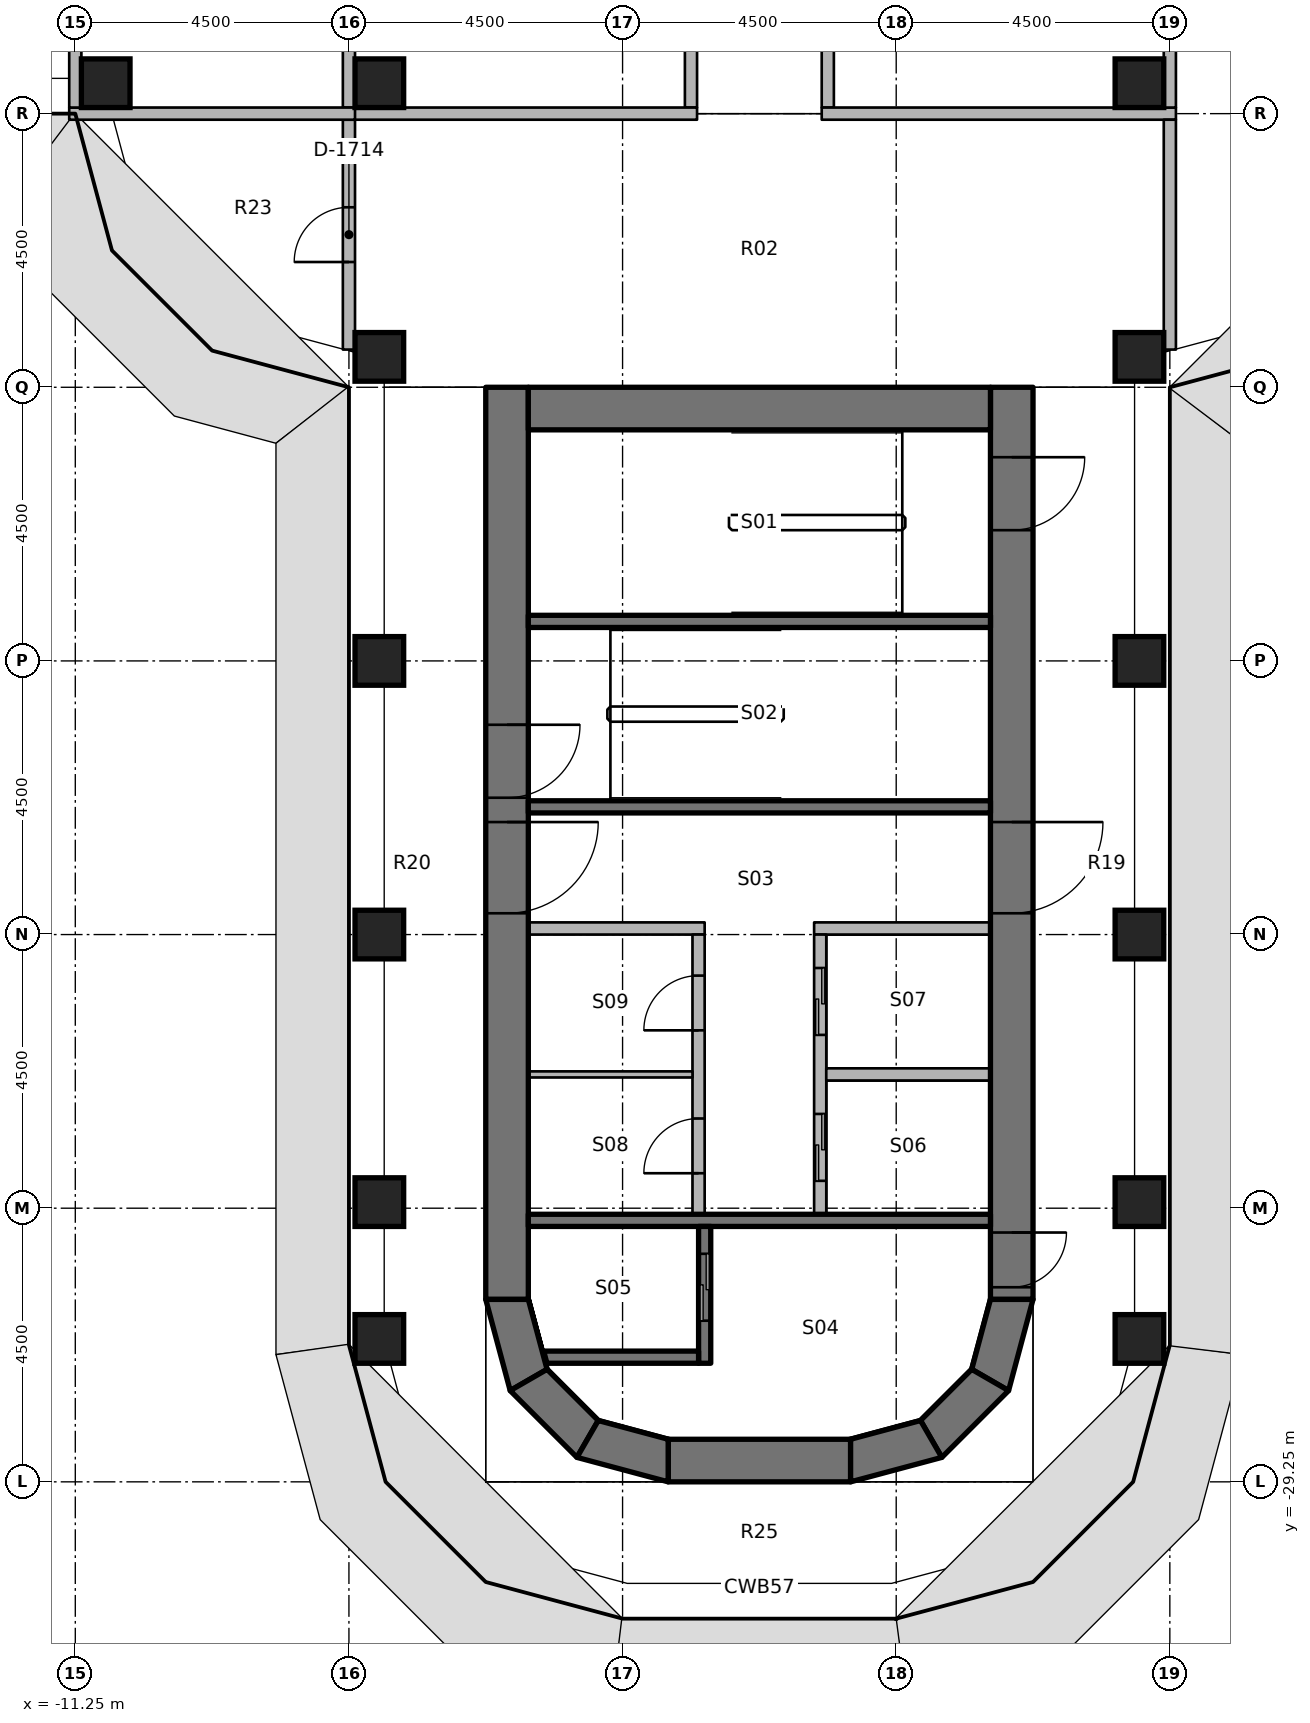
"""IFC4 building model, lengths in metres.
Left out: names, types, materials, properties, quantities, classifications, styles, units other than length and angle.
Written with IfcOpenShell. Run it as: python <this file> out.ifc"""

import sys

from ifc_helpers import new_model, si_unit, direction, frame, frame_2d, origin, origin_2d, place, context, subcontext, project, spatial, polyline, rectangle, outline, extrude, element, fill, save


model = new_model("IFC4")
c1 = context("Model", 3, precision=1e-05, world=origin(), true_north=direction((0.0, 1.0)))
c2 = subcontext(c1, "Body", "Model", "MODEL_VIEW")
j1 = project(units=[si_unit("LENGTHUNIT", "METRE"), si_unit("PLANEANGLEUNIT", "RADIAN")], contexts=[c1])
p1 = place(None, origin())
s1 = spatial("IfcSite", under=j1, at=p1, CompositionType="ELEMENT")
p2 = place(p1, origin())
s2 = spatial("IfcBuilding", under=s1, at=p2, CompositionType="ELEMENT")
p3 = place(p2, frame((0.0, 0.0, 160.0)))
s3 = spatial("IfcBuildingStorey", under=s2, at=p3, CompositionType="ELEMENT", Elevation=160.0)
for number, where, z_axis, x_axis in (
    (1, (-10.75, -6.25, 0.0), (0.0, 0.0, 1.0), (1.0, 0.0, 0.0)),
    (2, (-6.25, -26.9, 0.0), (0.0, 0.0, 1.0), (1.0, 0.0, 0.0)),
    (3, (-6.25, -24.65, 0.0), (0.0, 0.0, 1.0), (1.0, 0.0, 0.0)),
    (4, (-6.25, -20.25, 0.0), (0.0, 0.0, 1.0), (1.0, 0.0, 0.0)),
    (5, (-6.25, -15.75, 0.0), (0.0, 0.0, 1.0), (1.0, 0.0, 0.0)),
    (6, (-6.25, -10.75, 0.0), (0.0, 0.0, 1.0), (1.0, 0.0, 0.0)),
    (7, (-6.25, -6.25, 0.0), (0.0, 0.0, 1.0), (1.0, 0.0, 0.0)),
    (8, (6.25, -26.9, 0.0), (0.0, 0.0, 1.0), (1.0, 0.0, 0.0)),
    (9, (6.25, -24.65, 0.0), (0.0, 0.0, 1.0), (1.0, 0.0, 0.0)),
    (10, (6.25, -20.25, 0.0), (0.0, 0.0, 1.0), (1.0, 0.0, 0.0)),
    (11, (6.25, -15.75, 0.0), (0.0, 0.0, 1.0), (1.0, 0.0, 0.0)),
    (12, (6.25, -10.75, 0.0), (0.0, 0.0, 1.0), (1.0, 0.0, 0.0)),
    (13, (6.25, -6.25, 0.0), (0.0, 0.0, 1.0), (1.0, 0.0, 0.0)),
):
    element("IfcColumn", number, at=place(p3, frame(where, z_axis=z_axis, x_axis=x_axis)), inside=s3, PredefinedType="COLUMN", context=c2, shape_type="SweptSolid", body=[
        extrude(rectangle(XDim=0.8, YDim=0.8, at=origin_2d()), origin(), (0.0, 0.0, 1.0), 3.65),
    ])
p4 = place(p3, frame((-4.15, -11.25, 0.0), z_axis=(0.0, 0.0, 1.0), x_axis=(0.0, -1.0, 0.0)))
e14 = element("IfcWall", 14, at=p4, inside=s3, PredefinedType="SHEAR", context=c2, shape_type="SweptSolid", body=[
    extrude(rectangle(XDim=15.0, YDim=0.7, at=frame_2d((7.5, 0.0))), origin(), (0.0, 0.0, 1.0), 3.8),
])
p5 = place(p4, frame((7.15, 0.0, 0.0)))
e15 = element("IfcOpeningElement", 15, at=p5, cuts=e14, PredefinedType="OPENING", context=c2, shape_type="SweptSolid", body=[
    extrude(rectangle(XDim=1.5, YDim=2.3, at=frame_2d((0.75, 1.15))), frame((0.0, 0.36, 0.0), z_axis=(0.0, -1.0, 0.0), x_axis=(1.0, 0.0, 0.0)), (0.0, 0.0, 1.0), 0.72),
])
p6 = place(p4, frame((5.55, 0.0, 0.0)))
e16 = element("IfcOpeningElement", 16, at=p6, cuts=e14, PredefinedType="OPENING", context=c2, shape_type="SweptSolid", body=[
    extrude(rectangle(XDim=1.2, YDim=2.1, at=frame_2d((0.6, 1.05))), frame((0.0, 0.36, 0.0), z_axis=(0.0, -1.0, 0.0), x_axis=(1.0, 0.0, 0.0)), (0.0, 0.0, 1.0), 0.72),
])
p7 = place(p3, frame((4.15, -11.25, 0.0), z_axis=(0.0, 0.0, 1.0), x_axis=(0.0, -1.0, 0.0)))
e17 = element("IfcWall", 17, at=p7, inside=s3, PredefinedType="SHEAR", context=c2, shape_type="SweptSolid", body=[
    extrude(rectangle(XDim=15.0, YDim=0.7, at=frame_2d((7.5, 0.0))), origin(), (0.0, 0.0, 1.0), 3.8),
])
p8 = place(p7, frame((7.15, 0.0, 0.0)))
e18 = element("IfcOpeningElement", 18, at=p8, cuts=e17, PredefinedType="OPENING", context=c2, shape_type="SweptSolid", body=[
    extrude(rectangle(XDim=1.5, YDim=2.3, at=frame_2d((0.75, 1.15))), frame((0.0, 0.36, 0.0), z_axis=(0.0, -1.0, 0.0), x_axis=(1.0, 0.0, 0.0)), (0.0, 0.0, 1.0), 0.72),
])
p9 = place(p7, frame((13.9, 0.0, 0.0)))
e19 = element("IfcOpeningElement", 19, at=p9, cuts=e17, PredefinedType="OPENING", context=c2, shape_type="SweptSolid", body=[
    extrude(rectangle(XDim=0.9, YDim=2.1, at=frame_2d((0.45, 1.05))), frame((0.0, 0.36, 0.0), z_axis=(0.0, -1.0, 0.0), x_axis=(1.0, 0.0, 0.0)), (0.0, 0.0, 1.0), 0.72),
])
p10 = place(p7, frame((1.15, 0.0, 0.0)))
e20 = element("IfcOpeningElement", 20, at=p10, cuts=e17, PredefinedType="OPENING", context=c2, shape_type="SweptSolid", body=[
    extrude(rectangle(XDim=1.2, YDim=2.1, at=frame_2d((0.6, 1.05))), frame((0.0, 0.36, 0.0), z_axis=(0.0, -1.0, 0.0), x_axis=(1.0, 0.0, 0.0)), (0.0, 0.0, 1.0), 0.72),
])
p11 = place(p3, frame((-3.8, -11.6, 0.0), z_axis=(0.0, 0.0, 1.0), x_axis=(1.0, 0.0, 0.0)))
e21 = element("IfcWall", 21, at=p11, inside=s3, PredefinedType="SHEAR", context=c2, shape_type="SweptSolid", body=[
    extrude(rectangle(XDim=7.6, YDim=0.7, at=frame_2d((3.8, 0.0))), origin(), (0.0, 0.0, 1.0), 3.8),
])
p12 = place(p3, frame((-1.5, -28.9, 0.0), z_axis=(0.0, 0.0, 1.0), x_axis=(1.0, 0.0, 0.0)))
e22 = element("IfcWall", 22, at=p12, inside=s3, PredefinedType="SHEAR", context=c2, shape_type="SweptSolid", body=[
    extrude(rectangle(XDim=3.0, YDim=0.7, at=frame_2d((1.5, 0.0))), origin(), (0.0, 0.0, 1.0), 3.8),
])
p13 = place(p3, origin())
e23 = element("IfcWall", 23, at=p13, inside=s3, PredefinedType="SHEAR", context=c2, shape_type="SweptSolid", body=[
    extrude(outline(polyline([(-4.5, -26.25), (-4.098, -27.75), (-3.492, -27.4), (-3.8, -26.25), (-4.5, -26.25)])), origin(), (0.0, 0.0, 1.0), 3.8),
])
p14 = place(p3, origin())
e24 = element("IfcWall", 24, at=p14, inside=s3, PredefinedType="SHEAR", context=c2, shape_type="SweptSolid", body=[
    extrude(outline(polyline([(-4.098, -27.75), (-3.0, -28.848), (-2.65, -28.242), (-3.492, -27.4), (-4.098, -27.75)])), origin(), (0.0, 0.0, 1.0), 3.8),
])
p15 = place(p3, origin())
e25 = element("IfcWall", 25, at=p15, inside=s3, PredefinedType="SHEAR", context=c2, shape_type="SweptSolid", body=[
    extrude(outline(polyline([(-3.0, -28.848), (-1.5, -29.25), (-1.5, -28.55), (-2.65, -28.242), (-3.0, -28.848)])), origin(), (0.0, 0.0, 1.0), 3.8),
])
p16 = place(p3, origin())
e26 = element("IfcWall", 26, at=p16, inside=s3, PredefinedType="SHEAR", context=c2, shape_type="SweptSolid", body=[
    extrude(outline(polyline([(4.5, -26.25), (4.098, -27.75), (3.492, -27.4), (3.8, -26.25), (4.5, -26.25)])), origin(), (0.0, 0.0, 1.0), 3.8),
])
p17 = place(p3, origin())
e27 = element("IfcWall", 27, at=p17, inside=s3, PredefinedType="SHEAR", context=c2, shape_type="SweptSolid", body=[
    extrude(outline(polyline([(4.098, -27.75), (3.0, -28.848), (2.65, -28.242), (3.492, -27.4), (4.098, -27.75)])), origin(), (0.0, 0.0, 1.0), 3.8),
])
p18 = place(p3, origin())
e28 = element("IfcWall", 28, at=p18, inside=s3, PredefinedType="SHEAR", context=c2, shape_type="SweptSolid", body=[
    extrude(outline(polyline([(3.0, -28.848), (1.5, -29.25), (1.5, -28.55), (2.65, -28.242), (3.0, -28.848)])), origin(), (0.0, 0.0, 1.0), 3.8),
])
p19 = place(p3, frame((3.8, -24.95, 0.0), z_axis=(0.0, 0.0, 1.0), x_axis=(-1.0, 0.0, 0.0)))
e29 = element("IfcWall", 29, at=p19, inside=s3, PredefinedType="SHEAR", context=c2, shape_type="SweptSolid", body=[
    extrude(rectangle(XDim=7.6, YDim=0.2, at=frame_2d((3.8, 0.0))), origin(), (0.0, 0.0, 1.0), 3.65),
])
p20 = place(p3, frame((-0.9, -27.3, 0.0), z_axis=(0.0, 0.0, 1.0), x_axis=(0.0, 1.0, 0.0)))
e30 = element("IfcWall", 30, at=p20, inside=s3, PredefinedType="SHEAR", context=c2, shape_type="SweptSolid", body=[
    extrude(rectangle(XDim=2.25, YDim=0.2, at=frame_2d((1.125, 0.0))), origin(), (0.0, 0.0, 1.0), 3.65),
])
p21 = place(p20, frame((0.7, 0.0, 0.0)))
e31 = element("IfcOpeningElement", 31, at=p21, cuts=e30, PredefinedType="OPENING", context=c2, shape_type="SweptSolid", body=[
    extrude(rectangle(XDim=1.1, YDim=2.3, at=frame_2d((0.55, 1.15))), frame((0.0, 0.11, 0.0), z_axis=(0.0, -1.0, 0.0), x_axis=(1.0, 0.0, 0.0)), (0.0, 0.0, 1.0), 0.22),
])
p22 = place(p3, origin())
e32 = element("IfcWall", 32, at=p22, inside=s3, PredefinedType="SHEAR", context=c2, shape_type="SweptSolid", body=[
    extrude(outline(polyline([(-1.0, -27.1), (-3.548, -27.1), (-3.494, -27.3), (-1.0, -27.3), (-1.0, -27.1)])), origin(), (0.0, 0.0, 1.0), 3.65),
])
for number, where, z_axis, x_axis in (
    (33, (3.8, -18.15, 0.0), (0.0, 0.0, 1.0), (-1.0, 0.0, 0.0)),
    (34, (3.8, -15.1, 0.0), (0.0, 0.0, 1.0), (-1.0, 0.0, 0.0)),
):
    element("IfcWall", number, at=place(p3, frame(where, z_axis=z_axis, x_axis=x_axis)), inside=s3, PredefinedType="SHEAR", context=c2, shape_type="SweptSolid", body=[
        extrude(rectangle(XDim=7.6, YDim=0.2, at=frame_2d((3.8, 0.0))), origin(), (0.0, 0.0, 1.0), 3.65),
    ])
p23 = place(p3, frame((3.8, -20.15, 0.0), z_axis=(0.0, 0.0, 1.0), x_axis=(-1.0, 0.0, 0.0)))
e35 = element("IfcWall", 35, at=p23, inside=s3, PredefinedType="PARTITIONING", context=c2, shape_type="SweptSolid", body=[
    extrude(rectangle(XDim=2.9, YDim=0.2, at=frame_2d((1.45, 0.0))), origin(), (0.0, 0.0, 1.0), 3.65),
])
p24 = place(p3, frame((1.0, -24.85, 0.0), z_axis=(0.0, 0.0, 1.0), x_axis=(0.0, 1.0, 0.0)))
e36 = element("IfcWall", 36, at=p24, inside=s3, PredefinedType="PARTITIONING", context=c2, shape_type="SweptSolid", body=[
    extrude(rectangle(XDim=4.6, YDim=0.2, at=frame_2d((2.3, 0.0))), origin(), (0.0, 0.0, 1.0), 3.65),
])
p25 = place(p24, frame((0.55, 0.0, 0.0)))
e37 = element("IfcOpeningElement", 37, at=p25, cuts=e36, PredefinedType="OPENING", context=c2, shape_type="SweptSolid", body=[
    extrude(rectangle(XDim=1.1, YDim=2.3, at=frame_2d((0.55, 1.15))), frame((0.0, 0.11, 0.0), z_axis=(0.0, -1.0, 0.0), x_axis=(1.0, 0.0, 0.0)), (0.0, 0.0, 1.0), 0.22),
])
p26 = place(p24, frame((2.95, 0.0, 0.0)))
e38 = element("IfcOpeningElement", 38, at=p26, cuts=e36, PredefinedType="OPENING", context=c2, shape_type="SweptSolid", body=[
    extrude(rectangle(XDim=1.1, YDim=2.3, at=frame_2d((0.55, 1.15))), frame((0.0, 0.11, 0.0), z_axis=(0.0, -1.0, 0.0), x_axis=(1.0, 0.0, 0.0)), (0.0, 0.0, 1.0), 0.22),
])
p27 = place(p3, frame((-0.9, -20.15, 0.0), z_axis=(0.0, 0.0, 1.0), x_axis=(-1.0, 0.0, 0.0)))
e39 = element("IfcWall", 39, at=p27, inside=s3, PredefinedType="PARTITIONING", context=c2, shape_type="SweptSolid", body=[
    extrude(rectangle(XDim=2.9, YDim=0.2, at=frame_2d((1.45, 0.0))), origin(), (0.0, 0.0, 1.0), 3.65),
])
p28 = place(p3, frame((-1.0, -24.85, 0.0), z_axis=(0.0, 0.0, 1.0), x_axis=(0.0, 1.0, 0.0)))
e40 = element("IfcWall", 40, at=p28, inside=s3, PredefinedType="PARTITIONING", context=c2, shape_type="SweptSolid", body=[
    extrude(rectangle(XDim=4.6, YDim=0.2, at=frame_2d((2.3, 0.0))), origin(), (0.0, 0.0, 1.0), 3.65),
])
p29 = place(p28, frame((0.675, 0.0, 0.0)))
e41 = element("IfcOpeningElement", 41, at=p29, cuts=e40, PredefinedType="OPENING", context=c2, shape_type="SweptSolid", body=[
    extrude(rectangle(XDim=0.9, YDim=2.1, at=frame_2d((0.45, 1.05))), frame((0.0, 0.11, 0.0), z_axis=(0.0, -1.0, 0.0), x_axis=(1.0, 0.0, 0.0)), (0.0, 0.0, 1.0), 0.22),
])
p30 = place(p28, frame((3.025, 0.0, 0.0)))
e42 = element("IfcOpeningElement", 42, at=p30, cuts=e40, PredefinedType="OPENING", context=c2, shape_type="SweptSolid", body=[
    extrude(rectangle(XDim=0.9, YDim=2.1, at=frame_2d((0.45, 1.05))), frame((0.0, 0.11, 0.0), z_axis=(0.0, -1.0, 0.0), x_axis=(1.0, 0.0, 0.0)), (0.0, 0.0, 1.0), 0.22),
])
p31 = place(p3, frame((3.8, -22.55, 0.0), z_axis=(0.0, 0.0, 1.0), x_axis=(-1.0, 0.0, 0.0)))
e43 = element("IfcWall", 43, at=p31, inside=s3, PredefinedType="PARTITIONING", context=c2, shape_type="SweptSolid", body=[
    extrude(rectangle(XDim=2.7, YDim=0.2, at=frame_2d((1.35, 0.0))), origin(), (0.0, 0.0, 1.0), 3.65),
])
p32 = place(p3, frame((-1.1, -22.55, 0.0), z_axis=(0.0, 0.0, 1.0), x_axis=(-1.0, 0.0, 0.0)))
e44 = element("IfcWall", 44, at=p32, inside=s3, PredefinedType="PARTITIONING", context=c2, shape_type="SweptSolid", body=[
    extrude(rectangle(XDim=2.7, YDim=0.1, at=frame_2d((1.35, 0.0))), origin(), (0.0, 0.0, 1.0), 3.65),
])
for number, where, z_axis, x_axis in (
    (45, (1.125, -6.65, 0.0), (0.0, 0.0, 1.0), (0.0, 1.0, 0.0)),
    (46, (-1.125, -6.65, 0.0), (0.0, 0.0, 1.0), (0.0, 1.0, 0.0)),
):
    element("IfcWall", number, at=place(p3, frame(where, z_axis=z_axis, x_axis=x_axis)), inside=s3, PredefinedType="PARTITIONING", context=c2, shape_type="SweptSolid", body=[
        extrude(rectangle(XDim=4.3, YDim=0.2, at=frame_2d((2.15, 0.0))), origin(), (0.0, 0.0, 1.0), 2.75),
    ])
p33 = place(p3, frame((1.025, -6.75, 0.0), z_axis=(0.0, 0.0, 1.0), x_axis=(1.0, 0.0, 0.0)))
e47 = element("IfcWall", 47, at=p33, inside=s3, PredefinedType="PARTITIONING", context=c2, shape_type="SweptSolid", body=[
    extrude(rectangle(XDim=5.825, YDim=0.2, at=frame_2d((2.913, 0.0))), origin(), (0.0, 0.0, 1.0), 2.75),
])
p34 = place(p3, frame((6.75, -10.63, 0.0), z_axis=(0.0, 0.0, 1.0), x_axis=(0.0, 1.0, 0.0)))
e48 = element("IfcWall", 48, at=p34, inside=s3, PredefinedType="PARTITIONING", context=c2, shape_type="SweptSolid", body=[
    extrude(rectangle(XDim=3.78, YDim=0.2, at=frame_2d((1.89, 0.0))), origin(), (0.0, 0.0, 1.0), 2.75),
])
p35 = place(p3, frame((-6.85, -6.75, 0.0), z_axis=(0.0, 0.0, 1.0), x_axis=(1.0, 0.0, 0.0)))
e49 = element("IfcWall", 49, at=p35, inside=s3, PredefinedType="PARTITIONING", context=c2, shape_type="SweptSolid", body=[
    extrude(rectangle(XDim=5.825, YDim=0.2, at=frame_2d((2.913, 0.0))), origin(), (0.0, 0.0, 1.0), 2.75),
])
p36 = place(p3, frame((-6.75, -10.63, 0.0), z_axis=(0.0, 0.0, 1.0), x_axis=(0.0, 1.0, 0.0)))
e50 = element("IfcWall", 50, at=p36, inside=s3, PredefinedType="PARTITIONING", context=c2, shape_type="SweptSolid", body=[
    extrude(rectangle(XDim=3.78, YDim=0.2, at=frame_2d((1.89, 0.0))), origin(), (0.0, 0.0, 1.0), 2.75),
])
p37 = place(p36, frame((1.44, 0.0, 0.0)))
e51 = element("IfcOpeningElement", 51, at=p37, cuts=e50, PredefinedType="OPENING", context=c2, shape_type="SweptSolid", body=[
    extrude(rectangle(XDim=0.9, YDim=2.1, at=frame_2d((0.45, 1.05))), frame((0.0, 0.11, 0.0), z_axis=(0.0, -1.0, 0.0), x_axis=(1.0, 0.0, 0.0)), (0.0, 0.0, 1.0), 0.22),
])
for number, where, z_axis, x_axis in (
    (52, (6.75, -6.65, 0.0), (0.0, 0.0, 1.0), (0.0, 1.0, 0.0)),
    (53, (-6.75, -6.65, 0.0), (0.0, 0.0, 1.0), (0.0, 1.0, 0.0)),
):
    element("IfcWall", number, at=place(p3, frame(where, z_axis=z_axis, x_axis=x_axis)), inside=s3, PredefinedType="PARTITIONING", context=c2, shape_type="SweptSolid", body=[
        extrude(rectangle(XDim=4.3, YDim=0.2, at=frame_2d((2.15, 0.0))), origin(), (0.0, 0.0, 1.0), 2.75),
    ])
p38 = place(p3, frame((-11.35, -6.75, 0.0), z_axis=(0.0, 0.0, 1.0), x_axis=(1.0, 0.0, 0.0)))
e54 = element("IfcWall", 54, at=p38, inside=s3, PredefinedType="PARTITIONING", context=c2, shape_type="SweptSolid", body=[
    extrude(rectangle(XDim=4.7, YDim=0.2, at=frame_2d((2.35, 0.0))), origin(), (0.0, 0.0, 1.0), 2.75),
])
p39 = place(p3, frame((-11.25, -6.65, 0.0), z_axis=(0.0, 0.0, 1.0), x_axis=(0.0, 1.0, 0.0)))
e55 = element("IfcWall", 55, at=p39, inside=s3, PredefinedType="PARTITIONING", context=c2, shape_type="SweptSolid", body=[
    extrude(rectangle(XDim=4.3, YDim=0.2, at=frame_2d((2.15, 0.0))), origin(), (0.0, 0.0, 1.0), 2.75),
])
p40 = place(p8, origin())
e56 = element("IfcDoor", 56, at=p40, inside=s3, OperationType="DOUBLE_DOOR_SINGLE_SWING", PredefinedType="DOOR", context=c2, shape_type="SweptSolid", body=[
    extrude(rectangle(XDim=1.5, YDim=2.3, at=frame_2d((0.75, 1.15))), frame((0.0, 0.025, 0.0), z_axis=(0.0, -1.0, 0.0), x_axis=(1.0, 0.0, 0.0)), (0.0, 0.0, 1.0), 0.05),
])
fill(e18, e56)
p41 = place(p5, origin())
e57 = element("IfcDoor", 57, at=p41, inside=s3, OperationType="DOUBLE_DOOR_SINGLE_SWING", PredefinedType="DOOR", context=c2, shape_type="SweptSolid", body=[
    extrude(rectangle(XDim=1.5, YDim=2.3, at=frame_2d((0.75, 1.15))), frame((0.0, 0.025, 0.0), z_axis=(0.0, -1.0, 0.0), x_axis=(1.0, 0.0, 0.0)), (0.0, 0.0, 1.0), 0.05),
])
fill(e15, e57)
p42 = place(p9, origin())
e58 = element("IfcDoor", 58, at=p42, inside=s3, OperationType="SINGLE_SWING_LEFT", PredefinedType="DOOR", context=c2, shape_type="SweptSolid", body=[
    extrude(rectangle(XDim=0.9, YDim=2.1, at=frame_2d((0.45, 1.05))), frame((0.0, 0.025, 0.0), z_axis=(0.0, -1.0, 0.0), x_axis=(1.0, 0.0, 0.0)), (0.0, 0.0, 1.0), 0.05),
])
fill(e19, e58)
p43 = place(p6, origin())
e59 = element("IfcDoor", 59, at=p43, inside=s3, OperationType="SINGLE_SWING_RIGHT", PredefinedType="DOOR", context=c2, shape_type="SweptSolid", body=[
    extrude(rectangle(XDim=1.2, YDim=2.1, at=frame_2d((0.6, 1.05))), frame((0.0, 0.025, 0.0), z_axis=(0.0, -1.0, 0.0), x_axis=(1.0, 0.0, 0.0)), (0.0, 0.0, 1.0), 0.05),
])
fill(e16, e59)
p44 = place(p10, origin())
e60 = element("IfcDoor", 60, at=p44, inside=s3, OperationType="SINGLE_SWING_RIGHT", PredefinedType="DOOR", context=c2, shape_type="SweptSolid", body=[
    extrude(rectangle(XDim=1.2, YDim=2.1, at=frame_2d((0.6, 1.05))), frame((0.0, 0.025, 0.0), z_axis=(0.0, -1.0, 0.0), x_axis=(1.0, 0.0, 0.0)), (0.0, 0.0, 1.0), 0.05),
])
fill(e20, e60)
p45 = place(p21, origin())
e61 = element("IfcDoor", 61, at=p45, inside=s3, OperationType="DOUBLE_DOOR_SLIDING", PredefinedType="DOOR", context=c2, shape_type="SweptSolid", body=[
    extrude(rectangle(XDim=1.1, YDim=2.3, at=frame_2d((0.55, 1.15))), frame((0.0, 0.025, 0.0), z_axis=(0.0, -1.0, 0.0), x_axis=(1.0, 0.0, 0.0)), (0.0, 0.0, 1.0), 0.05),
])
fill(e31, e61)
p46 = place(p25, origin())
e62 = element("IfcDoor", 62, at=p46, inside=s3, OperationType="DOUBLE_DOOR_SLIDING", PredefinedType="DOOR", context=c2, shape_type="SweptSolid", body=[
    extrude(rectangle(XDim=1.1, YDim=2.3, at=frame_2d((0.55, 1.15))), frame((0.0, 0.025, 0.0), z_axis=(0.0, -1.0, 0.0), x_axis=(1.0, 0.0, 0.0)), (0.0, 0.0, 1.0), 0.05),
])
fill(e37, e62)
p47 = place(p26, origin())
e63 = element("IfcDoor", 63, at=p47, inside=s3, OperationType="DOUBLE_DOOR_SLIDING", PredefinedType="DOOR", context=c2, shape_type="SweptSolid", body=[
    extrude(rectangle(XDim=1.1, YDim=2.3, at=frame_2d((0.55, 1.15))), frame((0.0, 0.025, 0.0), z_axis=(0.0, -1.0, 0.0), x_axis=(1.0, 0.0, 0.0)), (0.0, 0.0, 1.0), 0.05),
])
fill(e38, e63)
p48 = place(p29, origin())
e64 = element("IfcDoor", 64, at=p48, inside=s3, OperationType="SINGLE_SWING_LEFT", PredefinedType="DOOR", context=c2, shape_type="SweptSolid", body=[
    extrude(rectangle(XDim=0.9, YDim=2.1, at=frame_2d((0.45, 1.05))), frame((0.0, 0.025, 0.0), z_axis=(0.0, -1.0, 0.0), x_axis=(1.0, 0.0, 0.0)), (0.0, 0.0, 1.0), 0.05),
])
fill(e41, e64)
p49 = place(p30, origin())
e65 = element("IfcDoor", 65, at=p49, inside=s3, OperationType="SINGLE_SWING_LEFT", PredefinedType="DOOR", context=c2, shape_type="SweptSolid", body=[
    extrude(rectangle(XDim=0.9, YDim=2.1, at=frame_2d((0.45, 1.05))), frame((0.0, 0.025, 0.0), z_axis=(0.0, -1.0, 0.0), x_axis=(1.0, 0.0, 0.0)), (0.0, 0.0, 1.0), 0.05),
])
fill(e42, e65)
p50 = place(p37, origin())
e66 = element("IfcDoor", 66, at=p50, inside=s3, OperationType="SINGLE_SWING_RIGHT", PredefinedType="DOOR", context=c2, shape_type="SweptSolid", body=[
    extrude(rectangle(XDim=0.9, YDim=2.1, at=frame_2d((0.45, 1.05))), frame((0.0, 0.025, 0.0), z_axis=(0.0, -1.0, 0.0), x_axis=(1.0, 0.0, 0.0)), (0.0, 0.0, 1.0), 0.05),
])
fill(e51, e66)
save(model, sys.argv[1])
